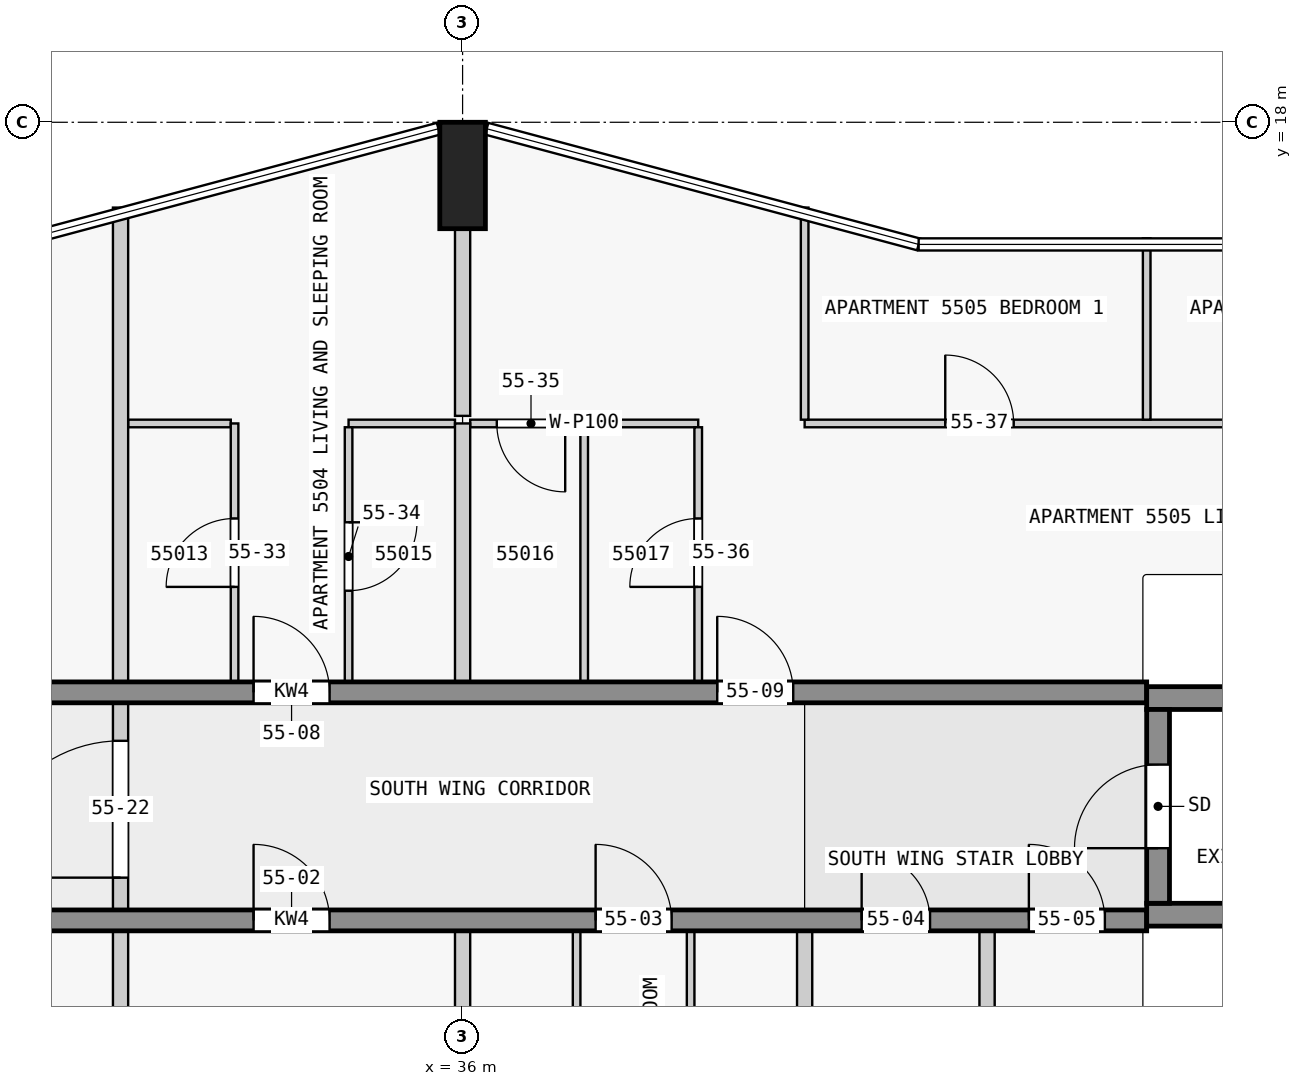
"""IFC4 building model, lengths in metres.
Left out: names, types, materials, properties, quantities, classifications, styles, units other than length and angle.
Written with IfcOpenShell. Run it as: python <this file> out.ifc"""

import sys

from ifc_helpers import new_model, si_unit, direction, frame, frame_2d, origin, origin_2d, place, context, subcontext, project, spatial, rectangle, extrude, element, fill, save


model = new_model("IFC4")
c1 = context("Model", 3, precision=1e-05, world=origin(), true_north=direction((0.0, 1.0)))
c2 = subcontext(c1, "Body", "Model", "MODEL_VIEW")
j1 = project(units=[si_unit("LENGTHUNIT", "METRE"), si_unit("PLANEANGLEUNIT", "RADIAN")], contexts=[c1])
p1 = place(None, origin())
s1 = spatial("IfcSite", under=j1, at=p1, CompositionType="ELEMENT")
p2 = place(p1, origin())
s2 = spatial("IfcBuilding", under=s1, at=p2, CompositionType="ELEMENT")
p3 = place(p2, frame((0.0, 0.0, 211.9)))
s3 = spatial("IfcBuildingStorey", under=s2, at=p3, CompositionType="ELEMENT", Elevation=211.9)
p4 = place(p3, frame((36.0, 17.3, 0.0), z_axis=(0.0, 0.0, 1.0), x_axis=(1.0, 0.0, 0.0)))
e1 = element("IfcColumn", 1, at=p4, inside=s3, PredefinedType="COLUMN", context=c2, shape_type="SweptSolid", body=[
    extrude(rectangle(XDim=0.6, YDim=1.4, at=origin_2d()), origin(), (0.0, 0.0, 1.0), 3.5),
])
p5 = place(p3, frame((45.15, 7.725, 0.0), z_axis=(0.0, 0.0, 1.0), x_axis=(0.0, 1.0, 0.0)))
e2 = element("IfcWall", 2, at=p5, inside=s3, PredefinedType="SHEAR", context=c2, shape_type="SweptSolid", body=[
    extrude(rectangle(XDim=2.55, YDim=0.3, at=frame_2d((1.275, 0.0))), origin(), (0.0, 0.0, 1.0), 3.5),
])
p6 = place(p5, frame((0.725, 0.0, 0.0)))
e3 = element("IfcOpeningElement", 3, at=p6, cuts=e2, PredefinedType="OPENING", context=c2, shape_type="SweptSolid", body=[
    extrude(rectangle(XDim=1.1, YDim=2.1, at=frame_2d((0.55, 1.05))), frame((0.0, 0.16, 0.0), z_axis=(0.0, -1.0, 0.0), x_axis=(1.0, 0.0, 0.0)), (0.0, 0.0, 1.0), 0.32),
])
for number, where, z_axis, x_axis in (
    (4, (45.0, 7.575, 0.0), (0.0, 0.0, 1.0), (1.0, 0.0, 0.0)),
    (5, (45.0, 10.425, 0.0), (0.0, 0.0, 1.0), (1.0, 0.0, 0.0)),
):
    element("IfcWall", number, at=place(p3, frame(where, z_axis=z_axis, x_axis=x_axis)), inside=s3, PredefinedType="SHEAR", context=c2, shape_type="SweptSolid", body=[
        extrude(rectangle(XDim=7.2, YDim=0.3, at=frame_2d((3.6, 0.0))), origin(), (0.0, 0.0, 1.0), 3.5),
    ])
p7 = place(p3, frame((22.5, 7.5, 0.0), z_axis=(0.0, 0.0, 1.0), x_axis=(1.0, 0.0, 0.0)))
e6 = element("IfcWall", 6, at=p7, inside=s3, PredefinedType="SHEAR", context=c2, shape_type="SweptSolid", body=[
    extrude(rectangle(XDim=22.5, YDim=0.275, at=frame_2d((11.25, 0.0))), origin(), (0.0, 0.0, 1.0), 3.25),
])
p8 = place(p7, frame((4.05, 0.0, 0.0)))
e7 = element("IfcOpeningElement", 7, at=p8, cuts=e6, PredefinedType="OPENING", context=c2, shape_type="SweptSolid", body=[
    extrude(rectangle(XDim=1.0, YDim=2.1, at=frame_2d((0.5, 1.05))), frame((0.0, 0.147, 0.0), z_axis=(0.0, -1.0, 0.0), x_axis=(1.0, 0.0, 0.0)), (0.0, 0.0, 1.0), 0.295),
])
p9 = place(p7, frame((10.75, 0.0, 0.0)))
e8 = element("IfcOpeningElement", 8, at=p9, cuts=e6, PredefinedType="OPENING", context=c2, shape_type="SweptSolid", body=[
    extrude(rectangle(XDim=1.0, YDim=2.1, at=frame_2d((0.5, 1.05))), frame((0.0, 0.147, 0.0), z_axis=(0.0, -1.0, 0.0), x_axis=(1.0, 0.0, 0.0)), (0.0, 0.0, 1.0), 0.295),
])
p10 = place(p7, frame((15.25, 0.0, 0.0)))
e9 = element("IfcOpeningElement", 9, at=p10, cuts=e6, PredefinedType="OPENING", context=c2, shape_type="SweptSolid", body=[
    extrude(rectangle(XDim=1.0, YDim=2.1, at=frame_2d((0.5, 1.05))), frame((0.0, 0.147, 0.0), z_axis=(0.0, -1.0, 0.0), x_axis=(1.0, 0.0, 0.0)), (0.0, 0.0, 1.0), 0.295),
])
p11 = place(p7, frame((18.75, 0.0, 0.0)))
e10 = element("IfcOpeningElement", 10, at=p11, cuts=e6, PredefinedType="OPENING", context=c2, shape_type="SweptSolid", body=[
    extrude(rectangle(XDim=0.9, YDim=2.1, at=frame_2d((0.45, 1.05))), frame((0.0, 0.147, 0.0), z_axis=(0.0, -1.0, 0.0), x_axis=(1.0, 0.0, 0.0)), (0.0, 0.0, 1.0), 0.295),
])
p12 = place(p7, frame((20.95, 0.0, 0.0)))
e11 = element("IfcOpeningElement", 11, at=p12, cuts=e6, PredefinedType="OPENING", context=c2, shape_type="SweptSolid", body=[
    extrude(rectangle(XDim=1.0, YDim=2.1, at=frame_2d((0.5, 1.05))), frame((0.0, 0.147, 0.0), z_axis=(0.0, -1.0, 0.0), x_axis=(1.0, 0.0, 0.0)), (0.0, 0.0, 1.0), 0.295),
])
p13 = place(p3, frame((22.5, 10.5, 0.0), z_axis=(0.0, 0.0, 1.0), x_axis=(1.0, 0.0, 0.0)))
e12 = element("IfcWall", 12, at=p13, inside=s3, PredefinedType="SHEAR", context=c2, shape_type="SweptSolid", body=[
    extrude(rectangle(XDim=22.5, YDim=0.275, at=frame_2d((11.25, 0.0))), origin(), (0.0, 0.0, 1.0), 3.25),
])
p14 = place(p13, frame((1.75, 0.0, 0.0)))
e13 = element("IfcOpeningElement", 13, at=p14, cuts=e12, PredefinedType="OPENING", context=c2, shape_type="SweptSolid", body=[
    extrude(rectangle(XDim=1.0, YDim=2.1, at=frame_2d((0.5, 1.05))), frame((0.0, 0.147, 0.0), z_axis=(0.0, -1.0, 0.0), x_axis=(1.0, 0.0, 0.0)), (0.0, 0.0, 1.0), 0.295),
])
p15 = place(p13, frame((5.85, 0.0, 0.0)))
e14 = element("IfcOpeningElement", 14, at=p15, cuts=e12, PredefinedType="OPENING", context=c2, shape_type="SweptSolid", body=[
    extrude(rectangle(XDim=1.8, YDim=2.1, at=frame_2d((0.9, 1.05))), frame((0.0, 0.147, 0.0), z_axis=(0.0, -1.0, 0.0), x_axis=(1.0, 0.0, 0.0)), (0.0, 0.0, 1.0), 0.295),
])
p16 = place(p13, frame((10.75, 0.0, 0.0)))
e15 = element("IfcOpeningElement", 15, at=p16, cuts=e12, PredefinedType="OPENING", context=c2, shape_type="SweptSolid", body=[
    extrude(rectangle(XDim=1.0, YDim=2.1, at=frame_2d((0.5, 1.05))), frame((0.0, 0.147, 0.0), z_axis=(0.0, -1.0, 0.0), x_axis=(1.0, 0.0, 0.0)), (0.0, 0.0, 1.0), 0.295),
])
p17 = place(p13, frame((16.85, 0.0, 0.0)))
e16 = element("IfcOpeningElement", 16, at=p17, cuts=e12, PredefinedType="OPENING", context=c2, shape_type="SweptSolid", body=[
    extrude(rectangle(XDim=1.0, YDim=2.1, at=frame_2d((0.5, 1.05))), frame((0.0, 0.147, 0.0), z_axis=(0.0, -1.0, 0.0), x_axis=(1.0, 0.0, 0.0)), (0.0, 0.0, 1.0), 0.295),
])
p18 = place(p3, frame((32.95, 14.038, 0.0), z_axis=(0.0, 0.0, 1.0), x_axis=(-1.0, 0.0, 0.0)))
e17 = element("IfcWall", 17, at=p18, inside=s3, PredefinedType="PARTITIONING", context=c2, shape_type="SweptSolid", body=[
    extrude(rectangle(XDim=1.35, YDim=0.1, at=frame_2d((0.675, 0.0))), origin(), (0.0, 0.0, 1.0), 3.25),
])
p19 = place(p3, frame((35.9, 14.038, 0.0), z_axis=(0.0, 0.0, 1.0), x_axis=(-1.0, 0.0, 0.0)))
e18 = element("IfcWall", 18, at=p19, inside=s3, PredefinedType="PARTITIONING", context=c2, shape_type="SweptSolid", body=[
    extrude(rectangle(XDim=1.4, YDim=0.1, at=frame_2d((0.7, 0.0))), origin(), (0.0, 0.0, 1.0), 3.25),
])
p20 = place(p3, frame((39.1, 14.038, 0.0), z_axis=(0.0, 0.0, 1.0), x_axis=(-1.0, 0.0, 0.0)))
e19 = element("IfcWall", 19, at=p20, inside=s3, PredefinedType="PARTITIONING", context=c2, shape_type="SweptSolid", body=[
    extrude(rectangle(XDim=3.0, YDim=0.1, at=frame_2d((1.5, 0.0))), origin(), (0.0, 0.0, 1.0), 3.25),
])
p21 = place(p20, frame((1.75, 0.0, 0.0)))
e20 = element("IfcOpeningElement", 20, at=p21, cuts=e19, PredefinedType="OPENING", context=c2, shape_type="SweptSolid", body=[
    extrude(rectangle(XDim=0.9, YDim=2.1, at=frame_2d((0.45, 1.05))), frame((0.0, 0.06, 0.0), z_axis=(0.0, -1.0, 0.0), x_axis=(1.0, 0.0, 0.0)), (0.0, 0.0, 1.0), 0.12),
])
p22 = place(p3, frame((40.5, 14.038, 0.0), z_axis=(0.0, 0.0, 1.0), x_axis=(1.0, 0.0, 0.0)))
e21 = element("IfcWall", 21, at=p22, inside=s3, PredefinedType="PARTITIONING", context=c2, shape_type="SweptSolid", body=[
    extrude(rectangle(XDim=13.58, YDim=0.1, at=frame_2d((6.79, 0.0))), origin(), (0.0, 0.0, 1.0), 3.25),
])
p23 = place(p22, frame((1.85, 0.0, 0.0)))
e22 = element("IfcOpeningElement", 22, at=p23, cuts=e21, PredefinedType="OPENING", context=c2, shape_type="SweptSolid", body=[
    extrude(rectangle(XDim=0.9, YDim=2.1, at=frame_2d((0.45, 1.05))), frame((0.0, 0.06, 0.0), z_axis=(0.0, -1.0, 0.0), x_axis=(1.0, 0.0, 0.0)), (0.0, 0.0, 1.0), 0.12),
])
p24 = place(p22, frame((6.35, 0.0, 0.0)))
e23 = element("IfcOpeningElement", 23, at=p24, cuts=e21, PredefinedType="OPENING", context=c2, shape_type="SweptSolid", body=[
    extrude(rectangle(XDim=0.9, YDim=2.1, at=frame_2d((0.45, 1.05))), frame((0.0, 0.06, 0.0), z_axis=(0.0, -1.0, 0.0), x_axis=(1.0, 0.0, 0.0)), (0.0, 0.0, 1.0), 0.12),
])
p25 = place(p22, frame((10.65, 0.0, 0.0)))
e24 = element("IfcOpeningElement", 24, at=p25, cuts=e21, PredefinedType="OPENING", context=c2, shape_type="SweptSolid", body=[
    extrude(rectangle(XDim=0.9, YDim=2.1, at=frame_2d((0.45, 1.05))), frame((0.0, 0.06, 0.0), z_axis=(0.0, -1.0, 0.0), x_axis=(1.0, 0.0, 0.0)), (0.0, 0.0, 1.0), 0.12),
])
for number, where, z_axis, x_axis in (
    (25, (31.5, 1.122, 0.0), (0.0, 0.0, 1.0), (0.0, 1.0, 0.0)),
    (26, (31.5, 10.637, 0.0), (0.0, 0.0, 1.0), (0.0, 1.0, 0.0)),
):
    element("IfcWall", number, at=place(p3, frame(where, z_axis=z_axis, x_axis=x_axis)), inside=s3, PredefinedType="PARTITIONING", context=c2, shape_type="SweptSolid", body=[
        extrude(rectangle(XDim=6.24, YDim=0.2, at=frame_2d((3.12, 0.0))), origin(), (0.0, 0.0, 1.0), 3.25),
    ])
p26 = place(p3, frame((33.0, 10.637, 0.0), z_axis=(0.0, 0.0, 1.0), x_axis=(0.0, 1.0, 0.0)))
e27 = element("IfcWall", 27, at=p26, inside=s3, PredefinedType="PARTITIONING", context=c2, shape_type="SweptSolid", body=[
    extrude(rectangle(XDim=3.4, YDim=0.1, at=frame_2d((1.7, 0.0))), origin(), (0.0, 0.0, 1.0), 3.25),
])
p27 = place(p26, frame((1.25, 0.0, 0.0)))
e28 = element("IfcOpeningElement", 28, at=p27, cuts=e27, PredefinedType="OPENING", context=c2, shape_type="SweptSolid", body=[
    extrude(rectangle(XDim=0.9, YDim=2.1, at=frame_2d((0.45, 1.05))), frame((0.0, 0.06, 0.0), z_axis=(0.0, -1.0, 0.0), x_axis=(1.0, 0.0, 0.0)), (0.0, 0.0, 1.0), 0.12),
])
p28 = place(p3, frame((34.5, 13.988, 0.0), z_axis=(0.0, 0.0, 1.0), x_axis=(0.0, -1.0, 0.0)))
e29 = element("IfcWall", 29, at=p28, inside=s3, PredefinedType="PARTITIONING", context=c2, shape_type="SweptSolid", body=[
    extrude(rectangle(XDim=3.35, YDim=0.1, at=frame_2d((1.675, 0.0))), origin(), (0.0, 0.0, 1.0), 3.25),
])
p29 = place(p28, frame((1.25, 0.0, 0.0)))
e30 = element("IfcOpeningElement", 30, at=p29, cuts=e29, PredefinedType="OPENING", context=c2, shape_type="SweptSolid", body=[
    extrude(rectangle(XDim=0.9, YDim=2.1, at=frame_2d((0.45, 1.05))), frame((0.0, 0.06, 0.0), z_axis=(0.0, -1.0, 0.0), x_axis=(1.0, 0.0, 0.0)), (0.0, 0.0, 1.0), 0.12),
])
p30 = place(p3, frame((36.0, 16.6, 0.0), z_axis=(0.0, 0.0, 1.0), x_axis=(0.0, -1.0, 0.0)))
e31 = element("IfcWall", 31, at=p30, inside=s3, PredefinedType="PARTITIONING", context=c2, shape_type="SweptSolid", body=[
    extrude(rectangle(XDim=2.463, YDim=0.2, at=frame_2d((1.231, 0.0))), origin(), (0.0, 0.0, 1.0), 3.25),
])
p31 = place(p3, frame((36.0, 1.4, 0.0), z_axis=(0.0, 0.0, 1.0), x_axis=(0.0, 1.0, 0.0)))
e32 = element("IfcWall", 32, at=p31, inside=s3, PredefinedType="PARTITIONING", context=c2, shape_type="SweptSolid", body=[
    extrude(rectangle(XDim=5.963, YDim=0.2, at=frame_2d((2.981, 0.0))), origin(), (0.0, 0.0, 1.0), 3.25),
])
p32 = place(p3, frame((36.0, 10.637, 0.0), z_axis=(0.0, 0.0, 1.0), x_axis=(0.0, 1.0, 0.0)))
e33 = element("IfcWall", 33, at=p32, inside=s3, PredefinedType="PARTITIONING", context=c2, shape_type="SweptSolid", body=[
    extrude(rectangle(XDim=3.4, YDim=0.2, at=frame_2d((1.7, 0.0))), origin(), (0.0, 0.0, 1.0), 3.25),
])
p33 = place(p3, frame((37.5, 3.962, 0.0), z_axis=(0.0, 0.0, 1.0), x_axis=(0.0, 1.0, 0.0)))
e34 = element("IfcWall", 34, at=p33, inside=s3, PredefinedType="PARTITIONING", context=c2, shape_type="SweptSolid", body=[
    extrude(rectangle(XDim=3.4, YDim=0.1, at=frame_2d((1.7, 0.0))), origin(), (0.0, 0.0, 1.0), 3.25),
])
p34 = place(p33, frame((1.25, 0.0, 0.0)))
e35 = element("IfcOpeningElement", 35, at=p34, cuts=e34, PredefinedType="OPENING", context=c2, shape_type="SweptSolid", body=[
    extrude(rectangle(XDim=0.9, YDim=2.1, at=frame_2d((0.45, 1.05))), frame((0.0, 0.06, 0.0), z_axis=(0.0, -1.0, 0.0), x_axis=(1.0, 0.0, 0.0)), (0.0, 0.0, 1.0), 0.12),
])
p35 = place(p3, frame((37.6, 10.637, 0.0), z_axis=(0.0, 0.0, 1.0), x_axis=(0.0, 1.0, 0.0)))
e36 = element("IfcWall", 36, at=p35, inside=s3, PredefinedType="PARTITIONING", context=c2, shape_type="SweptSolid", body=[
    extrude(rectangle(XDim=3.35, YDim=0.1, at=frame_2d((1.675, 0.0))), origin(), (0.0, 0.0, 1.0), 3.25),
])
p36 = place(p3, frame((39.0, 7.363, 0.0), z_axis=(0.0, 0.0, 1.0), x_axis=(0.0, -1.0, 0.0)))
e37 = element("IfcWall", 37, at=p36, inside=s3, PredefinedType="PARTITIONING", context=c2, shape_type="SweptSolid", body=[
    extrude(rectangle(XDim=3.4, YDim=0.1, at=frame_2d((1.7, 0.0))), origin(), (0.0, 0.0, 1.0), 3.25),
])
p37 = place(p36, frame((1.25, 0.0, 0.0)))
e38 = element("IfcOpeningElement", 38, at=p37, cuts=e37, PredefinedType="OPENING", context=c2, shape_type="SweptSolid", body=[
    extrude(rectangle(XDim=0.9, YDim=2.1, at=frame_2d((0.45, 1.05))), frame((0.0, 0.06, 0.0), z_axis=(0.0, -1.0, 0.0), x_axis=(1.0, 0.0, 0.0)), (0.0, 0.0, 1.0), 0.12),
])
p38 = place(p3, frame((39.1, 10.637, 0.0), z_axis=(0.0, 0.0, 1.0), x_axis=(0.0, 1.0, 0.0)))
e39 = element("IfcWall", 39, at=p38, inside=s3, PredefinedType="PARTITIONING", context=c2, shape_type="SweptSolid", body=[
    extrude(rectangle(XDim=3.35, YDim=0.1, at=frame_2d((1.675, 0.0))), origin(), (0.0, 0.0, 1.0), 3.25),
])
p39 = place(p38, frame((1.25, 0.0, 0.0)))
e40 = element("IfcOpeningElement", 40, at=p39, cuts=e39, PredefinedType="OPENING", context=c2, shape_type="SweptSolid", body=[
    extrude(rectangle(XDim=0.9, YDim=2.1, at=frame_2d((0.45, 1.05))), frame((0.0, 0.06, 0.0), z_axis=(0.0, -1.0, 0.0), x_axis=(1.0, 0.0, 0.0)), (0.0, 0.0, 1.0), 0.12),
])
p40 = place(p3, frame((40.5, 16.878, 0.0), z_axis=(0.0, 0.0, 1.0), x_axis=(0.0, -1.0, 0.0)))
e41 = element("IfcWall", 41, at=p40, inside=s3, PredefinedType="PARTITIONING", context=c2, shape_type="SweptSolid", body=[
    extrude(rectangle(XDim=2.79, YDim=0.1, at=frame_2d((1.395, 0.0))), origin(), (0.0, 0.0, 1.0), 3.25),
])
for number, where, z_axis, x_axis in (
    (42, (40.5, 3.962, 0.0), (0.0, 0.0, 1.0), (0.0, 1.0, 0.0)),
    (43, (42.9, 3.962, 0.0), (0.0, 0.0, 1.0), (0.0, 1.0, 0.0)),
):
    element("IfcWall", number, at=place(p3, frame(where, z_axis=z_axis, x_axis=x_axis)), inside=s3, PredefinedType="PARTITIONING", context=c2, shape_type="SweptSolid", body=[
        extrude(rectangle(XDim=3.4, YDim=0.2, at=frame_2d((1.7, 0.0))), origin(), (0.0, 0.0, 1.0), 3.25),
    ])
p41 = place(p3, frame((45.0, 14.087, 0.0), z_axis=(0.0, 0.0, 1.0), x_axis=(0.0, 1.0, 0.0)))
e44 = element("IfcWall", 44, at=p41, inside=s3, PredefinedType="PARTITIONING", context=c2, shape_type="SweptSolid", body=[
    extrude(rectangle(XDim=2.386, YDim=0.1, at=frame_2d((1.193, 0.0))), origin(), (0.0, 0.0, 1.0), 3.25),
])
p42 = place(p3, frame((31.5, 7.462, 0.0), z_axis=(0.0, 0.0, 1.0), x_axis=(0.0, 1.0, 0.0)))
e45 = element("IfcWall", 45, at=p42, inside=s3, PredefinedType="PARTITIONING", context=c2, shape_type="SweptSolid", body=[
    extrude(rectangle(XDim=3.075, YDim=0.2, at=frame_2d((1.538, 0.0))), origin(), (0.0, 0.0, 1.0), 3.25),
])
p43 = place(p42, frame((0.6, 0.0, 0.0)))
e46 = element("IfcOpeningElement", 46, at=p43, cuts=e45, PredefinedType="OPENING", context=c2, shape_type="SweptSolid", body=[
    extrude(rectangle(XDim=1.8, YDim=2.1, at=frame_2d((0.9, 1.05))), frame((0.0, 0.11, 0.0), z_axis=(0.0, -1.0, 0.0), x_axis=(1.0, 0.0, 0.0)), (0.0, 0.0, 1.0), 0.22),
])
p44 = place(p6, origin())
e47 = element("IfcDoor", 47, at=p44, inside=s3, OperationType="SINGLE_SWING_LEFT", PredefinedType="DOOR", context=c2, shape_type="SweptSolid", body=[
    extrude(rectangle(XDim=1.1, YDim=2.1, at=frame_2d((0.55, 1.05))), frame((0.0, 0.025, 0.0), z_axis=(0.0, -1.0, 0.0), x_axis=(1.0, 0.0, 0.0)), (0.0, 0.0, 1.0), 0.05),
])
fill(e3, e47)
p45 = place(p9, origin())
e48 = element("IfcDoor", 48, at=p45, inside=s3, OperationType="SINGLE_SWING_LEFT", PredefinedType="DOOR", context=c2, shape_type="SweptSolid", body=[
    extrude(rectangle(XDim=1.0, YDim=2.1, at=frame_2d((0.5, 1.05))), frame((0.0, 0.025, 0.0), z_axis=(0.0, -1.0, 0.0), x_axis=(1.0, 0.0, 0.0)), (0.0, 0.0, 1.0), 0.05),
])
fill(e8, e48)
p46 = place(p10, origin())
e49 = element("IfcDoor", 49, at=p46, inside=s3, OperationType="SINGLE_SWING_RIGHT", PredefinedType="DOOR", context=c2, shape_type="SweptSolid", body=[
    extrude(rectangle(XDim=1.0, YDim=2.1, at=frame_2d((0.5, 1.05))), frame((0.0, 0.025, 0.0), z_axis=(0.0, -1.0, 0.0), x_axis=(1.0, 0.0, 0.0)), (0.0, 0.0, 1.0), 0.05),
])
fill(e9, e49)
p47 = place(p11, origin())
e50 = element("IfcDoor", 50, at=p47, inside=s3, OperationType="SINGLE_SWING_RIGHT", PredefinedType="DOOR", context=c2, shape_type="SweptSolid", body=[
    extrude(rectangle(XDim=0.9, YDim=2.1, at=frame_2d((0.45, 1.05))), frame((0.0, 0.025, 0.0), z_axis=(0.0, -1.0, 0.0), x_axis=(1.0, 0.0, 0.0)), (0.0, 0.0, 1.0), 0.05),
])
fill(e10, e50)
p48 = place(p12, origin())
e51 = element("IfcDoor", 51, at=p48, inside=s3, OperationType="SINGLE_SWING_RIGHT", PredefinedType="DOOR", context=c2, shape_type="SweptSolid", body=[
    extrude(rectangle(XDim=1.0, YDim=2.1, at=frame_2d((0.5, 1.05))), frame((0.0, 0.025, 0.0), z_axis=(0.0, -1.0, 0.0), x_axis=(1.0, 0.0, 0.0)), (0.0, 0.0, 1.0), 0.05),
])
fill(e11, e51)
p49 = place(p16, origin())
e52 = element("IfcDoor", 52, at=p49, inside=s3, OperationType="SINGLE_SWING_LEFT", PredefinedType="DOOR", context=c2, shape_type="SweptSolid", body=[
    extrude(rectangle(XDim=1.0, YDim=2.1, at=frame_2d((0.5, 1.05))), frame((0.0, 0.025, 0.0), z_axis=(0.0, -1.0, 0.0), x_axis=(1.0, 0.0, 0.0)), (0.0, 0.0, 1.0), 0.05),
])
fill(e15, e52)
p50 = place(p17, origin())
e53 = element("IfcDoor", 53, at=p50, inside=s3, OperationType="SINGLE_SWING_RIGHT", PredefinedType="DOOR", context=c2, shape_type="SweptSolid", body=[
    extrude(rectangle(XDim=1.0, YDim=2.1, at=frame_2d((0.5, 1.05))), frame((0.0, 0.025, 0.0), z_axis=(0.0, -1.0, 0.0), x_axis=(1.0, 0.0, 0.0)), (0.0, 0.0, 1.0), 0.05),
])
fill(e16, e53)
p51 = place(p43, origin())
e54 = element("IfcDoor", 54, at=p51, inside=s3, OperationType="SINGLE_SWING_LEFT", PredefinedType="DOOR", context=c2, shape_type="SweptSolid", body=[
    extrude(rectangle(XDim=1.8, YDim=2.1, at=frame_2d((0.9, 1.05))), frame((0.0, 0.025, 0.0), z_axis=(0.0, -1.0, 0.0), x_axis=(1.0, 0.0, 0.0)), (0.0, 0.0, 1.0), 0.05),
])
fill(e46, e54)
p52 = place(p27, origin())
e55 = element("IfcDoor", 55, at=p52, inside=s3, OperationType="SINGLE_SWING_LEFT", PredefinedType="DOOR", context=c2, shape_type="SweptSolid", body=[
    extrude(rectangle(XDim=0.9, YDim=2.1, at=frame_2d((0.45, 1.05))), frame((0.0, 0.025, 0.0), z_axis=(0.0, -1.0, 0.0), x_axis=(1.0, 0.0, 0.0)), (0.0, 0.0, 1.0), 0.05),
])
fill(e28, e55)
p53 = place(p29, origin())
e56 = element("IfcDoor", 56, at=p53, inside=s3, OperationType="SINGLE_SWING_RIGHT", PredefinedType="DOOR", context=c2, shape_type="SweptSolid", body=[
    extrude(rectangle(XDim=0.9, YDim=2.1, at=frame_2d((0.45, 1.05))), frame((0.0, 0.025, 0.0), z_axis=(0.0, -1.0, 0.0), x_axis=(1.0, 0.0, 0.0)), (0.0, 0.0, 1.0), 0.05),
])
fill(e30, e56)
p54 = place(p21, origin())
e57 = element("IfcDoor", 57, at=p54, inside=s3, OperationType="SINGLE_SWING_RIGHT", PredefinedType="DOOR", context=c2, shape_type="SweptSolid", body=[
    extrude(rectangle(XDim=0.9, YDim=2.1, at=frame_2d((0.45, 1.05))), frame((0.0, 0.025, 0.0), z_axis=(0.0, -1.0, 0.0), x_axis=(1.0, 0.0, 0.0)), (0.0, 0.0, 1.0), 0.05),
])
fill(e20, e57)
p55 = place(p39, origin())
e58 = element("IfcDoor", 58, at=p55, inside=s3, OperationType="SINGLE_SWING_RIGHT", PredefinedType="DOOR", context=c2, shape_type="SweptSolid", body=[
    extrude(rectangle(XDim=0.9, YDim=2.1, at=frame_2d((0.45, 1.05))), frame((0.0, 0.025, 0.0), z_axis=(0.0, -1.0, 0.0), x_axis=(1.0, 0.0, 0.0)), (0.0, 0.0, 1.0), 0.05),
])
fill(e40, e58)
p56 = place(p23, origin())
e59 = element("IfcDoor", 59, at=p56, inside=s3, OperationType="SINGLE_SWING_LEFT", PredefinedType="DOOR", context=c2, shape_type="SweptSolid", body=[
    extrude(rectangle(XDim=0.9, YDim=2.1, at=frame_2d((0.45, 1.05))), frame((0.0, 0.025, 0.0), z_axis=(0.0, -1.0, 0.0), x_axis=(1.0, 0.0, 0.0)), (0.0, 0.0, 1.0), 0.05),
])
fill(e22, e59)
save(model, sys.argv[1])
